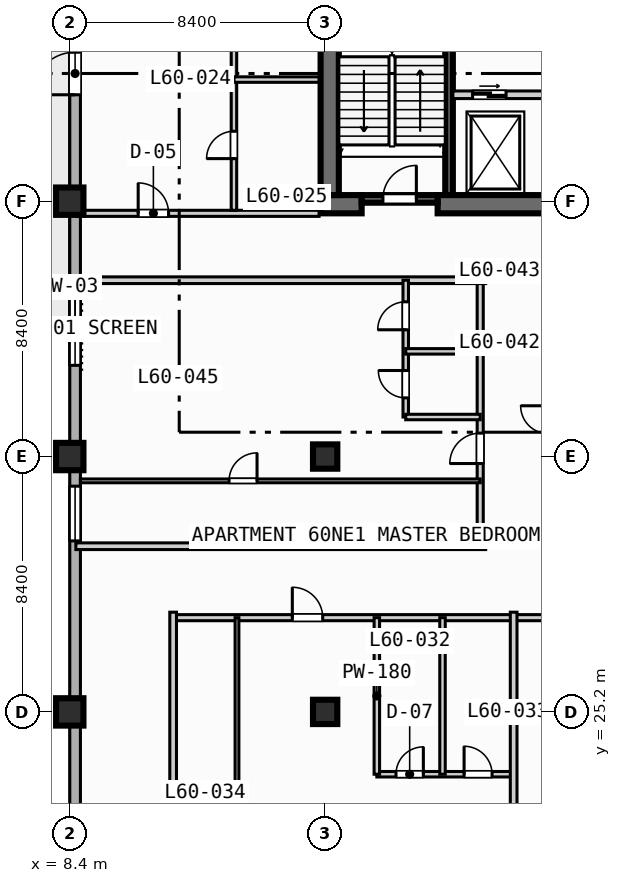
"""IFC4 building model, lengths in metres.
Left out: names, types, materials, properties, quantities, classifications, styles, units other than length and angle.
Written with IfcOpenShell. Run it as: python <this file> out.ifc"""

import sys

from ifc_helpers import new_model, si_unit, direction, frame, frame_2d, origin, origin_2d, place, context, subcontext, project, spatial, rectangle, extrude, element, fill, save


model = new_model("IFC4")
c1 = context("Model", 3, precision=1e-05, world=origin(), true_north=direction((0.0, 1.0)))
c2 = subcontext(c1, "Body", "Model", "MODEL_VIEW")
j1 = project(units=[si_unit("LENGTHUNIT", "METRE"), si_unit("PLANEANGLEUNIT", "RADIAN")], contexts=[c1])
p1 = place(None, origin())
s1 = spatial("IfcSite", under=j1, at=p1, CompositionType="ELEMENT")
p2 = place(p1, origin())
s2 = spatial("IfcBuilding", under=s1, at=p2, CompositionType="ELEMENT")
p3 = place(p2, frame((0.0, 0.0, 245.3)))
s3 = spatial("IfcBuildingStorey", under=s2, at=p3, CompositionType="ELEMENT", Elevation=245.3)
p4 = place(p3, frame((20.875, 42.2, 0.0), z_axis=(0.0, 0.0, 1.0), x_axis=(0.0, 1.0, 0.0)))
e1 = element("IfcWall", 1, at=p4, inside=s3, PredefinedType="SOLIDWALL", context=c2, shape_type="SweptSolid", body=[
    extrude(rectangle(XDim=8.05, YDim=0.25, at=frame_2d((4.025, 0.0))), origin(), (0.0, 0.0, 1.0), 3.47),
])
p5 = place(p3, frame((16.65, 41.9, 0.0), z_axis=(0.0, 0.0, 1.0), x_axis=(1.0, 0.0, 0.0)))
e2 = element("IfcWall", 2, at=p5, inside=s3, PredefinedType="SHEAR", context=c2, shape_type="SweptSolid", body=[
    extrude(rectangle(XDim=1.35, YDim=0.6, at=frame_2d((0.675, 0.0))), origin(), (0.0, 0.0, 1.0), 3.47),
])
p6 = place(p3, frame((20.5, 41.9, 0.0), z_axis=(0.0, 0.0, 1.0), x_axis=(1.0, 0.0, 0.0)))
e3 = element("IfcWall", 3, at=p6, inside=s3, PredefinedType="SHEAR", context=c2, shape_type="SweptSolid", body=[
    extrude(rectangle(XDim=5.0, YDim=0.6, at=frame_2d((2.5, 0.0))), origin(), (0.0, 0.0, 1.0), 3.47),
])
p7 = place(p3, frame((16.95, 42.2, 0.0), z_axis=(0.0, 0.0, 1.0), x_axis=(0.0, 1.0, 0.0)))
e4 = element("IfcWall", 4, at=p7, inside=s3, PredefinedType="SHEAR", context=c2, shape_type="SweptSolid", body=[
    extrude(rectangle(XDim=16.35, YDim=0.6, at=frame_2d((8.175, 0.0))), origin(), (0.0, 0.0, 1.0), 3.47),
])
for number, where, z_axis, x_axis in (
    (5, (8.4, 25.2, 0.0), (0.0, 0.0, 1.0), (1.0, 0.0, 0.0)),
    (6, (8.4, 33.6, 0.0), (0.0, 0.0, 1.0), (1.0, 0.0, 0.0)),
    (7, (8.4, 42.0, 0.0), (0.0, 0.0, 1.0), (1.0, 0.0, 0.0)),
):
    element("IfcColumn", number, at=place(p3, frame(where, z_axis=z_axis, x_axis=x_axis)), inside=s3, PredefinedType="COLUMN", context=c2, shape_type="SweptSolid", body=[
        extrude(rectangle(XDim=0.9, YDim=0.9, at=origin_2d()), origin(), (0.0, 0.0, 1.0), 3.7),
    ])
for number, where, z_axis, x_axis in (
    (8, (16.8, 25.2, 0.0), (0.0, 0.0, 1.0), (1.0, 0.0, 0.0)),
    (9, (16.8, 33.6, 0.0), (0.0, 0.0, 1.0), (1.0, 0.0, 0.0)),
):
    element("IfcColumn", number, at=place(p3, frame(where, z_axis=z_axis, x_axis=x_axis)), inside=s3, PredefinedType="COLUMN", context=c2, shape_type="SweptSolid", body=[
        extrude(rectangle(XDim=0.8, YDim=0.8, at=origin_2d()), origin(), (0.0, 0.0, 1.0), 3.7),
    ])
p8 = place(p3, frame((8.575, 11.575, 0.0), z_axis=(0.0, 0.0, 1.0), x_axis=(0.0, 1.0, 0.0)))
e10 = element("IfcWall", 10, at=p8, inside=s3, PredefinedType="STANDARD", context=c2, shape_type="SweptSolid", body=[
    extrude(rectangle(XDim=60.85, YDim=0.35, at=frame_2d((30.425, 0.0))), origin(), (0.0, 0.0, 1.0), 3.47),
])
p9 = place(p8, frame((33.925, 0.0, 0.0)))
e11 = element("IfcOpeningElement", 11, at=p9, cuts=e10, PredefinedType="OPENING", context=c2, shape_type="SweptSolid", body=[
    extrude(rectangle(XDim=1.4, YDim=2.2, at=frame_2d((0.7, 1.1))), frame((0.0, 0.185, 0.0), z_axis=(0.0, -1.0, 0.0), x_axis=(1.0, 0.0, 0.0)), (0.0, 0.0, 1.0), 0.37),
])
p10 = place(p8, frame((25.025, 0.0, 0.85)))
e12 = element("IfcOpeningElement", 12, at=p10, cuts=e10, PredefinedType="OPENING", context=c2, shape_type="SweptSolid", body=[
    extrude(rectangle(XDim=2.4, YDim=1.95, at=frame_2d((1.2, 0.975))), frame((0.0, 0.185, 0.0), z_axis=(0.0, -1.0, 0.0), x_axis=(1.0, 0.0, 0.0)), (0.0, 0.0, 1.0), 0.37),
])
p11 = place(p8, frame((41.825, 0.0, 0.85)))
e13 = element("IfcOpeningElement", 13, at=p11, cuts=e10, PredefinedType="OPENING", context=c2, shape_type="SweptSolid", body=[
    extrude(rectangle(XDim=2.4, YDim=1.95, at=frame_2d((1.2, 0.975))), frame((0.0, 0.185, 0.0), z_axis=(0.0, -1.0, 0.0), x_axis=(1.0, 0.0, 0.0)), (0.0, 0.0, 1.0), 0.37),
])
p12 = place(p8, frame((19.25, 0.0, 0.85)))
e14 = element("IfcOpeningElement", 14, at=p12, cuts=e10, PredefinedType="OPENING", context=c2, shape_type="SweptSolid", body=[
    extrude(rectangle(XDim=1.8, YDim=1.8, at=frame_2d((0.9, 0.9))), frame((0.0, 0.185, 0.0), z_axis=(0.0, -1.0, 0.0), x_axis=(1.0, 0.0, 0.0)), (0.0, 0.0, 1.0), 0.37),
])
p13 = place(p3, frame((18.0, 42.075, 0.0), z_axis=(0.0, 0.0, 1.0), x_axis=(1.0, 0.0, 0.0)))
e15 = element("IfcWall", 15, at=p13, inside=s3, PredefinedType="SOLIDWALL", context=c2, shape_type="SweptSolid", body=[
    extrude(rectangle(XDim=2.5, YDim=0.25, at=frame_2d((1.25, 0.0))), origin(), (0.0, 0.0, 1.0), 3.47),
])
p14 = place(p13, frame((0.7, 0.0, 0.0)))
e16 = element("IfcOpeningElement", 16, at=p14, cuts=e15, PredefinedType="OPENING", context=c2, shape_type="SweptSolid", body=[
    extrude(rectangle(XDim=1.1, YDim=2.15, at=frame_2d((0.55, 1.075))), frame((0.0, 0.135, 0.0), z_axis=(0.0, -1.0, 0.0), x_axis=(1.0, 0.0, 0.0)), (0.0, 0.0, 1.0), 0.27),
])
p15 = place(p3, frame((21.0, 45.5, 0.0), z_axis=(0.0, 0.0, 1.0), x_axis=(1.0, 0.0, 0.0)))
e17 = element("IfcWall", 17, at=p15, inside=s3, PredefinedType="SOLIDWALL", context=c2, shape_type="SweptSolid", body=[
    extrude(rectangle(XDim=4.15, YDim=0.25, at=frame_2d((2.075, 0.0))), origin(), (0.0, 0.0, 1.0), 3.47),
])
p16 = place(p15, frame((0.65, 0.0, 0.0)))
e18 = element("IfcOpeningElement", 18, at=p16, cuts=e17, PredefinedType="OPENING", context=c2, shape_type="SweptSolid", body=[
    extrude(rectangle(XDim=1.1, YDim=2.15, at=frame_2d((0.55, 1.075))), frame((0.0, 0.135, 0.0), z_axis=(0.0, -1.0, 0.0), x_axis=(1.0, 0.0, 0.0)), (0.0, 0.0, 1.0), 0.27),
])
p17 = place(p3, frame((8.65, 41.6, 0.0), z_axis=(0.0, 0.0, 1.0), x_axis=(1.0, 0.0, 0.0)))
e19 = element("IfcWall", 19, at=p17, inside=s3, PredefinedType="PARTITIONING", context=c2, shape_type="SweptSolid", body=[
    extrude(rectangle(XDim=7.95, YDim=0.2, at=frame_2d((3.975, 0.0))), origin(), (0.0, 0.0, 1.0), 3.47),
])
p18 = place(p17, frame((2.0, 0.0, 0.0)))
e20 = element("IfcOpeningElement", 20, at=p18, cuts=e19, PredefinedType="OPENING", context=c2, shape_type="SweptSolid", body=[
    extrude(rectangle(XDim=1.0, YDim=2.15, at=frame_2d((0.5, 1.075))), frame((0.0, 0.11, 0.0), z_axis=(0.0, -1.0, 0.0), x_axis=(1.0, 0.0, 0.0)), (0.0, 0.0, 1.0), 0.22),
])
p19 = place(p3, frame((13.8, 41.7, 0.0), z_axis=(0.0, 0.0, 1.0), x_axis=(0.0, 1.0, 0.0)))
e21 = element("IfcWall", 21, at=p19, inside=s3, PredefinedType="PLUMBINGWALL", context=c2, shape_type="SweptSolid", body=[
    extrude(rectangle(XDim=8.6, YDim=0.18, at=frame_2d((4.3, 0.0))), origin(), (0.0, 0.0, 1.0), 3.47),
])
p20 = place(p19, frame((1.7, 0.0, 0.0)))
e22 = element("IfcOpeningElement", 22, at=p20, cuts=e21, PredefinedType="OPENING", context=c2, shape_type="SweptSolid", body=[
    extrude(rectangle(XDim=0.9, YDim=2.1, at=frame_2d((0.45, 1.05))), frame((0.0, 0.1, 0.0), z_axis=(0.0, -1.0, 0.0), x_axis=(1.0, 0.0, 0.0)), (0.0, 0.0, 1.0), 0.2),
])
p21 = place(p19, frame((5.99, 0.0, 0.0)))
e23 = element("IfcOpeningElement", 23, at=p21, cuts=e21, PredefinedType="OPENING", context=c2, shape_type="SweptSolid", body=[
    extrude(rectangle(XDim=0.92, YDim=2.1, at=frame_2d((0.46, 1.05))), frame((0.0, 0.1, 0.0), z_axis=(0.0, -1.0, 0.0), x_axis=(1.0, 0.0, 0.0)), (0.0, 0.0, 1.0), 0.2),
])
p22 = place(p3, frame((13.8, 46.0, 0.0), z_axis=(0.0, 0.0, 1.0), x_axis=(1.0, 0.0, 0.0)))
e24 = element("IfcWall", 24, at=p22, inside=s3, PredefinedType="PLUMBINGWALL", context=c2, shape_type="SweptSolid", body=[
    extrude(rectangle(XDim=2.8, YDim=0.18, at=frame_2d((1.4, 0.0))), origin(), (0.0, 0.0, 1.0), 3.47),
])
p23 = place(p3, frame((11.8, 28.3, 0.0), z_axis=(0.0, 0.0, 1.0), x_axis=(1.0, 0.0, 0.0)))
e25 = element("IfcWall", 25, at=p23, inside=s3, PredefinedType="PARTITIONING", context=c2, shape_type="SweptSolid", body=[
    extrude(rectangle(XDim=27.6, YDim=0.2, at=frame_2d((13.8, 0.0))), origin(), (0.0, 0.0, 1.0), 3.47),
])
p24 = place(p23, frame((3.92, 0.0, 0.0)))
e26 = element("IfcOpeningElement", 26, at=p24, cuts=e25, PredefinedType="OPENING", context=c2, shape_type="SweptSolid", body=[
    extrude(rectangle(XDim=1.0, YDim=2.15, at=frame_2d((0.5, 1.075))), frame((0.0, 0.11, 0.0), z_axis=(0.0, -1.0, 0.0), x_axis=(1.0, 0.0, 0.0)), (0.0, 0.0, 1.0), 0.22),
])
p25 = place(p23, frame((12.57, 0.0, 0.0)))
e27 = element("IfcOpeningElement", 27, at=p25, cuts=e25, PredefinedType="OPENING", context=c2, shape_type="SweptSolid", body=[
    extrude(rectangle(XDim=1.0, YDim=2.15, at=frame_2d((0.5, 1.075))), frame((0.0, 0.11, 0.0), z_axis=(0.0, -1.0, 0.0), x_axis=(1.0, 0.0, 0.0)), (0.0, 0.0, 1.0), 0.22),
])
p26 = place(p23, frame((20.77, 0.0, 0.0)))
e28 = element("IfcOpeningElement", 28, at=p26, cuts=e25, PredefinedType="OPENING", context=c2, shape_type="SweptSolid", body=[
    extrude(rectangle(XDim=1.0, YDim=2.15, at=frame_2d((0.5, 1.075))), frame((0.0, 0.11, 0.0), z_axis=(0.0, -1.0, 0.0), x_axis=(1.0, 0.0, 0.0)), (0.0, 0.0, 1.0), 0.22),
])
p27 = place(p3, frame((11.8, 8.6, 0.0), z_axis=(0.0, 0.0, 1.0), x_axis=(0.0, 1.0, 0.0)))
e29 = element("IfcWall", 29, at=p27, inside=s3, PredefinedType="PARTITIONING", context=c2, shape_type="SweptSolid", body=[
    extrude(rectangle(XDim=19.88, YDim=0.22, at=frame_2d((9.94, 0.0))), origin(), (0.0, 0.0, 1.0), 3.47),
])
p28 = place(p3, frame((18.5, 23.15, 0.0), z_axis=(0.0, 0.0, 1.0), x_axis=(1.0, 0.0, 0.0)))
e30 = element("IfcWall", 30, at=p28, inside=s3, PredefinedType="PLUMBINGWALL", context=c2, shape_type="SweptSolid", body=[
    extrude(rectangle(XDim=4.5, YDim=0.18, at=frame_2d((2.25, 0.0))), origin(), (0.0, 0.0, 1.0), 3.47),
])
p29 = place(p28, frame((0.63, 0.0, 0.0)))
e31 = element("IfcOpeningElement", 31, at=p29, cuts=e30, PredefinedType="OPENING", context=c2, shape_type="SweptSolid", body=[
    extrude(rectangle(XDim=0.9, YDim=2.1, at=frame_2d((0.45, 1.05))), frame((0.0, 0.1, 0.0), z_axis=(0.0, -1.0, 0.0), x_axis=(1.0, 0.0, 0.0)), (0.0, 0.0, 1.0), 0.2),
])
p30 = place(p28, frame((2.87, 0.0, 0.0)))
e32 = element("IfcOpeningElement", 32, at=p30, cuts=e30, PredefinedType="OPENING", context=c2, shape_type="SweptSolid", body=[
    extrude(rectangle(XDim=0.92, YDim=2.1, at=frame_2d((0.46, 1.05))), frame((0.0, 0.1, 0.0), z_axis=(0.0, -1.0, 0.0), x_axis=(1.0, 0.0, 0.0)), (0.0, 0.0, 1.0), 0.2),
])
for number, where, z_axis, x_axis in (
    (33, (18.5, 23.15, 0.0), (0.0, 0.0, 1.0), (0.0, 1.0, 0.0)),
    (34, (20.66, 23.15, 0.0), (0.0, 0.0, 1.0), (0.0, 1.0, 0.0)),
):
    element("IfcWall", number, at=place(p3, frame(where, z_axis=z_axis, x_axis=x_axis)), inside=s3, PredefinedType="PLUMBINGWALL", context=c2, shape_type="SweptSolid", body=[
        extrude(rectangle(XDim=5.15, YDim=0.18, at=frame_2d((2.575, 0.0))), origin(), (0.0, 0.0, 1.0), 3.47),
    ])
p31 = place(p3, frame((13.9, 8.75, 0.0), z_axis=(0.0, 0.0, 1.0), x_axis=(0.0, 1.0, 0.0)))
e35 = element("IfcWall", 35, at=p31, inside=s3, PredefinedType="PARTITIONING", context=c2, shape_type="SweptSolid", body=[
    extrude(rectangle(XDim=19.55, YDim=0.125, at=frame_2d((9.775, 0.0))), origin(), (0.0, 0.0, 1.0), 3.47),
])
p32 = place(p31, frame((6.74, 0.0, 0.0)))
e36 = element("IfcOpeningElement", 36, at=p32, cuts=e35, PredefinedType="OPENING", context=c2, shape_type="SweptSolid", body=[
    extrude(rectangle(XDim=0.92, YDim=2.1, at=frame_2d((0.46, 1.05))), frame((0.0, 0.073, 0.0), z_axis=(0.0, -1.0, 0.0), x_axis=(1.0, 0.0, 0.0)), (0.0, 0.0, 1.0), 0.145),
])
p33 = place(p3, frame((23.0, 8.6, 0.0), z_axis=(0.0, 0.0, 1.0), x_axis=(0.0, 1.0, 0.0)))
e37 = element("IfcWall", 37, at=p33, inside=s3, PredefinedType="PARTITIONING", context=c2, shape_type="SweptSolid", body=[
    extrude(rectangle(XDim=19.88, YDim=0.22, at=frame_2d((9.94, 0.0))), origin(), (0.0, 0.0, 1.0), 3.47),
])
p34 = place(p3, frame((21.9, 30.65, 0.0), z_axis=(0.0, 0.0, 1.0), x_axis=(0.0, 1.0, 0.0)))
e38 = element("IfcWall", 38, at=p34, inside=s3, PredefinedType="PARTITIONING", context=c2, shape_type="SweptSolid", body=[
    extrude(rectangle(XDim=8.75, YDim=0.2, at=frame_2d((4.375, 0.0))), origin(), (0.0, 0.0, 1.0), 3.47),
])
p35 = place(p34, frame((2.72, 0.0, 0.0)))
e39 = element("IfcOpeningElement", 39, at=p35, cuts=e38, PredefinedType="OPENING", context=c2, shape_type="SweptSolid", body=[
    extrude(rectangle(XDim=1.0, YDim=2.15, at=frame_2d((0.5, 1.075))), frame((0.0, 0.11, 0.0), z_axis=(0.0, -1.0, 0.0), x_axis=(1.0, 0.0, 0.0)), (0.0, 0.0, 1.0), 0.22),
])
for number, where, z_axis, x_axis in (
    (40, (8.6, 30.65, 0.0), (0.0, 0.0, 1.0), (1.0, 0.0, 0.0)),
    (41, (8.6, 39.4, 0.0), (0.0, 0.0, 1.0), (1.0, 0.0, 0.0)),
):
    element("IfcWall", number, at=place(p3, frame(where, z_axis=z_axis, x_axis=x_axis)), inside=s3, PredefinedType="PARTITIONING", context=c2, shape_type="SweptSolid", body=[
        extrude(rectangle(XDim=13.48, YDim=0.22, at=frame_2d((6.74, 0.0))), origin(), (0.0, 0.0, 1.0), 3.47),
    ])
p36 = place(p3, frame((19.45, 34.9, 0.0), z_axis=(0.0, 0.0, 1.0), x_axis=(0.0, 1.0, 0.0)))
e42 = element("IfcWall", 42, at=p36, inside=s3, PredefinedType="PLUMBINGWALL", context=c2, shape_type="SweptSolid", body=[
    extrude(rectangle(XDim=4.5, YDim=0.18, at=frame_2d((2.25, 0.0))), origin(), (0.0, 0.0, 1.0), 3.47),
])
p37 = place(p36, frame((0.63, 0.0, 0.0)))
e43 = element("IfcOpeningElement", 43, at=p37, cuts=e42, PredefinedType="OPENING", context=c2, shape_type="SweptSolid", body=[
    extrude(rectangle(XDim=0.9, YDim=2.1, at=frame_2d((0.45, 1.05))), frame((0.0, 0.1, 0.0), z_axis=(0.0, -1.0, 0.0), x_axis=(1.0, 0.0, 0.0)), (0.0, 0.0, 1.0), 0.2),
])
p38 = place(p36, frame((2.87, 0.0, 0.0)))
e44 = element("IfcOpeningElement", 44, at=p38, cuts=e42, PredefinedType="OPENING", context=c2, shape_type="SweptSolid", body=[
    extrude(rectangle(XDim=0.92, YDim=2.1, at=frame_2d((0.46, 1.05))), frame((0.0, 0.1, 0.0), z_axis=(0.0, -1.0, 0.0), x_axis=(1.0, 0.0, 0.0)), (0.0, 0.0, 1.0), 0.2),
])
for number, where, z_axis, x_axis in (
    (45, (19.45, 34.9, 0.0), (0.0, 0.0, 1.0), (1.0, 0.0, 0.0)),
    (46, (19.45, 37.06, 0.0), (0.0, 0.0, 1.0), (1.0, 0.0, 0.0)),
):
    element("IfcWall", number, at=place(p3, frame(where, z_axis=z_axis, x_axis=x_axis)), inside=s3, PredefinedType="PLUMBINGWALL", context=c2, shape_type="SweptSolid", body=[
        extrude(rectangle(XDim=2.45, YDim=0.18, at=frame_2d((1.225, 0.0))), origin(), (0.0, 0.0, 1.0), 3.47),
    ])
p39 = place(p3, frame((8.75, 32.8, 0.0), z_axis=(0.0, 0.0, 1.0), x_axis=(1.0, 0.0, 0.0)))
e47 = element("IfcWall", 47, at=p39, inside=s3, PredefinedType="PARTITIONING", context=c2, shape_type="SweptSolid", body=[
    extrude(rectangle(XDim=13.15, YDim=0.125, at=frame_2d((6.575, 0.0))), origin(), (0.0, 0.0, 1.0), 3.47),
])
p40 = place(p39, frame((4.89, 0.0, 0.0)))
e48 = element("IfcOpeningElement", 48, at=p40, cuts=e47, PredefinedType="OPENING", context=c2, shape_type="SweptSolid", body=[
    extrude(rectangle(XDim=0.92, YDim=2.1, at=frame_2d((0.46, 1.05))), frame((0.0, 0.073, 0.0), z_axis=(0.0, -1.0, 0.0), x_axis=(1.0, 0.0, 0.0)), (0.0, 0.0, 1.0), 0.145),
])
p41 = place(p9, origin())
e49 = element("IfcDoor", 49, at=p41, inside=s3, OperationType="SINGLE_SWING_LEFT", PredefinedType="DOOR", context=c2, shape_type="SweptSolid", body=[
    extrude(rectangle(XDim=1.4, YDim=2.2, at=frame_2d((0.7, 1.1))), frame((0.0, 0.025, 0.0), z_axis=(0.0, -1.0, 0.0), x_axis=(1.0, 0.0, 0.0)), (0.0, 0.0, 1.0), 0.05),
])
fill(e11, e49)
p42 = place(p10, origin())
e50 = element("IfcWindow", 50, at=p42, inside=s3, PartitioningType="SINGLE_PANEL", PredefinedType="WINDOW", context=c2, shape_type="SweptSolid", body=[
    extrude(rectangle(XDim=2.4, YDim=1.95, at=frame_2d((1.2, 0.975))), frame((0.0, 0.03, 0.0), z_axis=(0.0, -1.0, 0.0), x_axis=(1.0, 0.0, 0.0)), (0.0, 0.0, 1.0), 0.06),
])
fill(e12, e50)
p43 = place(p12, origin())
e51 = element("IfcWindow", 51, at=p43, inside=s3, PartitioningType="SINGLE_PANEL", PredefinedType="WINDOW", context=c2, shape_type="SweptSolid", body=[
    extrude(rectangle(XDim=1.8, YDim=1.8, at=frame_2d((0.9, 0.9))), frame((0.0, 0.03, 0.0), z_axis=(0.0, -1.0, 0.0), x_axis=(1.0, 0.0, 0.0)), (0.0, 0.0, 1.0), 0.06),
])
fill(e14, e51)
p44 = place(p14, origin())
e52 = element("IfcDoor", 52, at=p44, inside=s3, OperationType="SINGLE_SWING_RIGHT", PredefinedType="DOOR", context=c2, shape_type="SweptSolid", body=[
    extrude(rectangle(XDim=1.1, YDim=2.15, at=frame_2d((0.55, 1.075))), frame((0.0, 0.025, 0.0), z_axis=(0.0, -1.0, 0.0), x_axis=(1.0, 0.0, 0.0)), (0.0, 0.0, 1.0), 0.05),
])
fill(e16, e52)
p45 = place(p16, origin())
e53 = element("IfcDoor", 53, at=p45, inside=s3, OperationType="SLIDING_TO_LEFT", PredefinedType="DOOR", context=c2, shape_type="SweptSolid", body=[
    extrude(rectangle(XDim=1.1, YDim=2.15, at=frame_2d((0.55, 1.075))), frame((0.0, 0.025, 0.0), z_axis=(0.0, -1.0, 0.0), x_axis=(1.0, 0.0, 0.0)), (0.0, 0.0, 1.0), 0.05),
])
fill(e18, e53)
p46 = place(p18, origin())
e54 = element("IfcDoor", 54, at=p46, inside=s3, OperationType="SINGLE_SWING_LEFT", PredefinedType="DOOR", context=c2, shape_type="SweptSolid", body=[
    extrude(rectangle(XDim=1.0, YDim=2.15, at=frame_2d((0.5, 1.075))), frame((0.0, 0.025, 0.0), z_axis=(0.0, -1.0, 0.0), x_axis=(1.0, 0.0, 0.0)), (0.0, 0.0, 1.0), 0.05),
])
fill(e20, e54)
p47 = place(p20, origin())
e55 = element("IfcDoor", 55, at=p47, inside=s3, OperationType="SINGLE_SWING_LEFT", PredefinedType="DOOR", context=c2, shape_type="SweptSolid", body=[
    extrude(rectangle(XDim=0.9, YDim=2.1, at=frame_2d((0.45, 1.05))), frame((0.0, 0.025, 0.0), z_axis=(0.0, -1.0, 0.0), x_axis=(1.0, 0.0, 0.0)), (0.0, 0.0, 1.0), 0.05),
])
fill(e22, e55)
p48 = place(p24, origin())
e56 = element("IfcDoor", 56, at=p48, inside=s3, OperationType="SINGLE_SWING_LEFT", PredefinedType="DOOR", context=c2, shape_type="SweptSolid", body=[
    extrude(rectangle(XDim=1.0, YDim=2.15, at=frame_2d((0.5, 1.075))), frame((0.0, 0.025, 0.0), z_axis=(0.0, -1.0, 0.0), x_axis=(1.0, 0.0, 0.0)), (0.0, 0.0, 1.0), 0.05),
])
fill(e26, e56)
p49 = place(p29, origin())
e57 = element("IfcDoor", 57, at=p49, inside=s3, OperationType="SINGLE_SWING_RIGHT", PredefinedType="DOOR", context=c2, shape_type="SweptSolid", body=[
    extrude(rectangle(XDim=0.9, YDim=2.1, at=frame_2d((0.45, 1.05))), frame((0.0, 0.025, 0.0), z_axis=(0.0, -1.0, 0.0), x_axis=(1.0, 0.0, 0.0)), (0.0, 0.0, 1.0), 0.05),
])
fill(e31, e57)
p50 = place(p30, origin())
e58 = element("IfcDoor", 58, at=p50, inside=s3, OperationType="SINGLE_SWING_LEFT", PredefinedType="DOOR", context=c2, shape_type="SweptSolid", body=[
    extrude(rectangle(XDim=0.92, YDim=2.1, at=frame_2d((0.46, 1.05))), frame((0.0, 0.025, 0.0), z_axis=(0.0, -1.0, 0.0), x_axis=(1.0, 0.0, 0.0)), (0.0, 0.0, 1.0), 0.05),
])
fill(e32, e58)
p51 = place(p35, origin())
e59 = element("IfcDoor", 59, at=p51, inside=s3, OperationType="SINGLE_SWING_LEFT", PredefinedType="DOOR", context=c2, shape_type="SweptSolid", body=[
    extrude(rectangle(XDim=1.0, YDim=2.15, at=frame_2d((0.5, 1.075))), frame((0.0, 0.025, 0.0), z_axis=(0.0, -1.0, 0.0), x_axis=(1.0, 0.0, 0.0)), (0.0, 0.0, 1.0), 0.05),
])
fill(e39, e59)
p52 = place(p37, origin())
e60 = element("IfcDoor", 60, at=p52, inside=s3, OperationType="SINGLE_SWING_RIGHT", PredefinedType="DOOR", context=c2, shape_type="SweptSolid", body=[
    extrude(rectangle(XDim=0.9, YDim=2.1, at=frame_2d((0.45, 1.05))), frame((0.0, 0.025, 0.0), z_axis=(0.0, -1.0, 0.0), x_axis=(1.0, 0.0, 0.0)), (0.0, 0.0, 1.0), 0.05),
])
fill(e43, e60)
p53 = place(p38, origin())
e61 = element("IfcDoor", 61, at=p53, inside=s3, OperationType="SINGLE_SWING_LEFT", PredefinedType="DOOR", context=c2, shape_type="SweptSolid", body=[
    extrude(rectangle(XDim=0.92, YDim=2.1, at=frame_2d((0.46, 1.05))), frame((0.0, 0.025, 0.0), z_axis=(0.0, -1.0, 0.0), x_axis=(1.0, 0.0, 0.0)), (0.0, 0.0, 1.0), 0.05),
])
fill(e44, e61)
p54 = place(p40, origin())
e62 = element("IfcDoor", 62, at=p54, inside=s3, OperationType="SINGLE_SWING_RIGHT", PredefinedType="DOOR", context=c2, shape_type="SweptSolid", body=[
    extrude(rectangle(XDim=0.92, YDim=2.1, at=frame_2d((0.46, 1.05))), frame((0.0, 0.025, 0.0), z_axis=(0.0, -1.0, 0.0), x_axis=(1.0, 0.0, 0.0)), (0.0, 0.0, 1.0), 0.05),
])
fill(e48, e62)
save(model, sys.argv[1])
